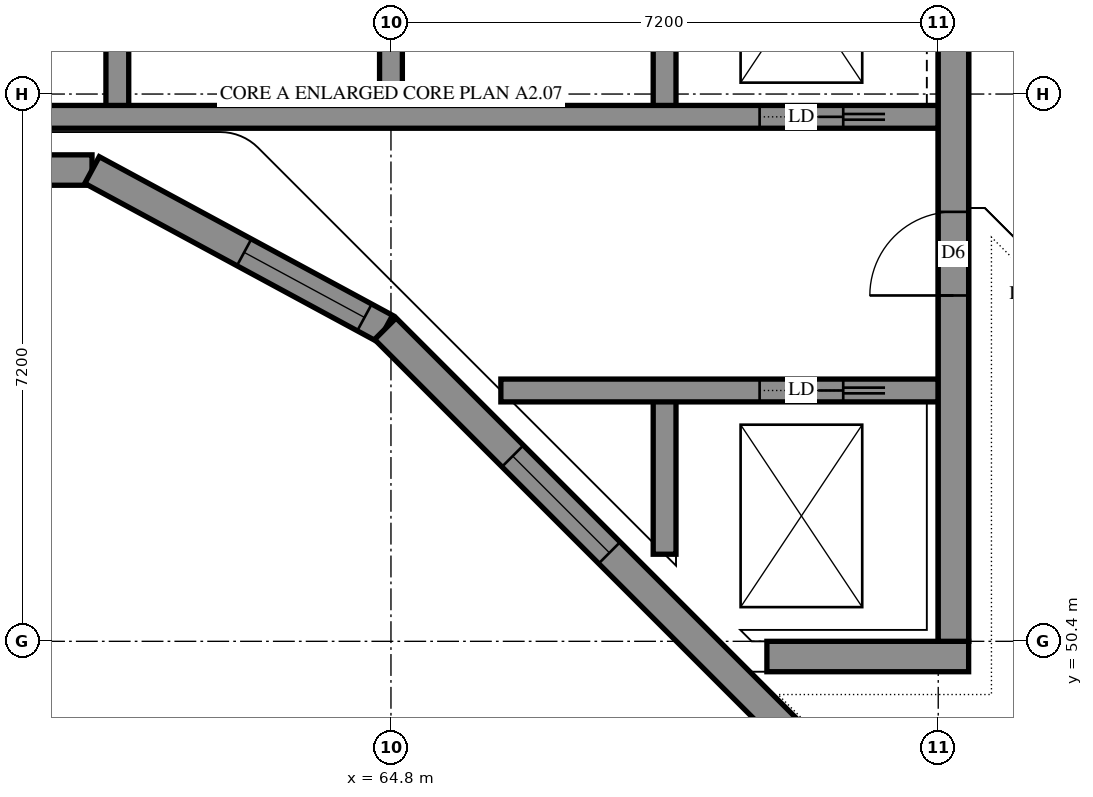
"""IFC4 building model, lengths in metres.
Left out: names, types, materials, properties, quantities, classifications, styles, units other than length and angle.
Written with IfcOpenShell. Run it as: python <this file> out.ifc"""

import sys

from ifc_helpers import new_model, si_unit, direction, frame, frame_2d, origin, place, context, subcontext, project, spatial, polyline, rectangle, outline, extrude, element, fill, save


model = new_model("IFC4")
c1 = context("Model", 3, precision=1e-05, world=origin(), true_north=direction((0.0, 1.0)))
c2 = subcontext(c1, "Body", "Model", "MODEL_VIEW")
j1 = project(units=[si_unit("LENGTHUNIT", "METRE"), si_unit("PLANEANGLEUNIT", "RADIAN")], contexts=[c1])
p1 = place(None, origin())
s1 = spatial("IfcSite", under=j1, at=p1, CompositionType="ELEMENT")
p2 = place(p1, origin())
s2 = spatial("IfcBuilding", under=s1, at=p2, CompositionType="ELEMENT")
p3 = place(p2, frame((0.0, 0.0, 298.2)))
s3 = spatial("IfcBuildingStorey", under=s2, at=p3, CompositionType="ELEMENT", Elevation=298.2)
p4 = place(p3, frame((69.746, 50.2, -0.3), z_axis=(0.0, 0.0, 1.0), x_axis=(1.0, 0.0, 0.0)))
e1 = element("IfcWall", 1, at=p4, inside=s3, PredefinedType="SHEAR", context=c2, shape_type="SweptSolid", body=[
    extrude(outline(polyline([(0.0, 0.0), (2.654, 0.0), (2.654, 3.1), (0.0, 3.1), (0.0, 0.0)])), frame((0.0, 0.2, 0.0), z_axis=(0.0, -1.0, 0.0), x_axis=(1.0, 0.0, 0.0)), (0.0, 0.0, 1.0), 0.4),
])
p5 = place(p3, frame((72.2, 50.4, -0.3), z_axis=(0.0, 0.0, 1.0), x_axis=(0.0, 1.0, 0.0)))
e2 = element("IfcWall", 2, at=p5, inside=s3, PredefinedType="SHEAR", context=c2, shape_type="SweptSolid", body=[
    extrude(outline(polyline([(0.0, 0.0), (14.4, 0.0), (14.4, 3.1), (0.0, 3.1), (0.0, 0.0)])), frame((0.0, 0.2, 0.0), z_axis=(0.0, -1.0, 0.0), x_axis=(1.0, 0.0, 0.0)), (0.0, 0.0, 1.0), 0.4),
])
p6 = place(p5, frame((4.55, 0.0, 0.3)))
e3 = element("IfcOpeningElement", 3, at=p6, cuts=e2, PredefinedType="OPENING", context=c2, shape_type="SweptSolid", body=[
    extrude(rectangle(XDim=1.1, YDim=2.1, at=frame_2d((0.55, 1.05))), frame((0.0, 0.21, 0.0), z_axis=(0.0, -1.0, 0.0), x_axis=(1.0, 0.0, 0.0)), (0.0, 0.0, 1.0), 0.42),
])
p7 = place(p5, frame((11.35, 0.0, 0.3)))
e4 = element("IfcOpeningElement", 4, at=p7, cuts=e2, PredefinedType="OPENING", context=c2, shape_type="SweptSolid", body=[
    extrude(rectangle(XDim=1.1, YDim=2.1, at=frame_2d((0.55, 1.05))), frame((0.0, 0.21, 0.0), z_axis=(0.0, -1.0, 0.0), x_axis=(1.0, 0.0, 0.0)), (0.0, 0.0, 1.0), 0.42),
])
for number, where, z_axis, x_axis in (
    (5, (61.2, 57.3, 0.0), (0.0, 0.0, 1.0), (0.0, 1.0, 0.0)),
    (6, (64.8, 57.3, 0.0), (0.0, 0.0, 1.0), (0.0, 1.0, 0.0)),
):
    element("IfcWall", number, at=place(p3, frame(where, z_axis=z_axis, x_axis=x_axis)), inside=s3, PredefinedType="SOLIDWALL", context=c2, shape_type="SweptSolid", body=[
        extrude(outline(polyline([(0.0, 0.0), (3.3, 0.0), (3.3, 3.5), (0.0, 3.5), (0.0, 0.0)])), frame((0.0, 0.15, 0.0), z_axis=(0.0, -1.0, 0.0), x_axis=(1.0, 0.0, 0.0)), (0.0, 0.0, 1.0), 0.3),
    ])
p8 = place(p3, frame((68.4, 51.546, 0.0), z_axis=(0.0, 0.0, 1.0), x_axis=(0.0, 1.0, 0.0)))
e7 = element("IfcWall", 7, at=p8, inside=s3, PredefinedType="SOLIDWALL", context=c2, shape_type="SweptSolid", body=[
    extrude(outline(polyline([(0.0, 0.0), (2.154, 0.0), (2.154, 3.5), (0.0, 3.5), (0.0, 0.0)])), frame((0.0, 0.15, 0.0), z_axis=(0.0, -1.0, 0.0), x_axis=(1.0, 0.0, 0.0)), (0.0, 0.0, 1.0), 0.3),
])
p9 = place(p3, frame((68.4, 57.3, 0.0), z_axis=(0.0, 0.0, 1.0), x_axis=(0.0, 1.0, 0.0)))
e8 = element("IfcWall", 8, at=p9, inside=s3, PredefinedType="SOLIDWALL", context=c2, shape_type="SweptSolid", body=[
    extrude(outline(polyline([(0.0, 0.0), (3.3, 0.0), (3.3, 3.5), (0.0, 3.5), (0.0, 0.0)])), frame((0.0, 0.15, 0.0), z_axis=(0.0, -1.0, 0.0), x_axis=(1.0, 0.0, 0.0)), (0.0, 0.0, 1.0), 0.3),
])
p10 = place(p3, frame((66.246, 53.7, 0.0), z_axis=(0.0, 0.0, 1.0), x_axis=(1.0, 0.0, 0.0)))
e9 = element("IfcWall", 9, at=p10, inside=s3, PredefinedType="SOLIDWALL", context=c2, shape_type="SweptSolid", body=[
    extrude(outline(polyline([(0.0, 0.0), (5.754, 0.0), (5.754, 3.5), (0.0, 3.5), (0.0, 0.0)])), frame((0.0, 0.15, 0.0), z_axis=(0.0, -1.0, 0.0), x_axis=(1.0, 0.0, 0.0)), (0.0, 0.0, 1.0), 0.3),
])
p11 = place(p10, frame((3.404, 0.0, 0.0)))
e10 = element("IfcOpeningElement", 10, at=p11, cuts=e9, PredefinedType="OPENING", context=c2, shape_type="SweptSolid", body=[
    extrude(rectangle(XDim=1.1, YDim=2.1, at=frame_2d((0.55, 1.05))), frame((0.0, 0.16, 0.0), z_axis=(0.0, -1.0, 0.0), x_axis=(1.0, 0.0, 0.0)), (0.0, 0.0, 1.0), 0.32),
])
p12 = place(p3, frame((57.6, 57.3, 0.0), z_axis=(0.0, 0.0, 1.0), x_axis=(1.0, 0.0, 0.0)))
e11 = element("IfcWall", 11, at=p12, inside=s3, PredefinedType="SOLIDWALL", context=c2, shape_type="SweptSolid", body=[
    extrude(outline(polyline([(0.0, 0.0), (14.4, 0.0), (14.4, 3.5), (0.0, 3.5), (0.0, 0.0)])), frame((0.0, 0.15, 0.0), z_axis=(0.0, -1.0, 0.0), x_axis=(1.0, 0.0, 0.0)), (0.0, 0.0, 1.0), 0.3),
])
p13 = place(p12, frame((12.05, 0.0, 0.0)))
e12 = element("IfcOpeningElement", 12, at=p13, cuts=e11, PredefinedType="OPENING", context=c2, shape_type="SweptSolid", body=[
    extrude(rectangle(XDim=1.1, YDim=2.1, at=frame_2d((0.55, 1.05))), frame((0.0, 0.16, 0.0), z_axis=(0.0, -1.0, 0.0), x_axis=(1.0, 0.0, 0.0)), (0.0, 0.0, 1.0), 0.32),
])
p14 = place(p3, frame((56.6, 56.6, 0.0), z_axis=(0.0, 0.0, 1.0), x_axis=(1.0, 0.0, 0.0)))
e13 = element("IfcWall", 13, at=p14, inside=s3, PredefinedType="SOLIDWALL", context=c2, shape_type="SweptSolid", body=[
    extrude(outline(polyline([(-0.2, -0.2), (4.216, -0.2), (4.318, 0.2), (0.2, 0.2), (-0.2, -0.2)])), origin(), (0.0, 0.0, 1.0), 3.5),
])
p15 = place(p14, frame((1.633, 0.0, 0.7)))
e14 = element("IfcOpeningElement", 14, at=p15, cuts=e13, PredefinedType="OPENING", context=c2, shape_type="SweptSolid", body=[
    extrude(rectangle(XDim=1.8, YDim=2.2, at=frame_2d((0.9, 1.1))), frame((0.0, 0.21, 0.0), z_axis=(0.0, -1.0, 0.0), x_axis=(1.0, 0.0, 0.0)), (0.0, 0.0, 1.0), 0.42),
])
p16 = place(p3, frame((60.867, 56.6, 0.0), z_axis=(0.0, 0.0, 1.0), x_axis=(0.8795817564, -0.4757477628, 0.0)))
e15 = element("IfcWall", 15, at=p16, inside=s3, PredefinedType="SOLIDWALL", context=c2, shape_type="SweptSolid", body=[
    extrude(outline(polyline([(0.051, -0.2), (4.358, -0.2), (4.416, 0.2), (-0.051, 0.2), (0.051, -0.2)])), origin(), (0.0, 0.0, 1.0), 3.5),
])
p17 = place(p16, frame((2.276, 0.0, 0.7)))
e16 = element("IfcOpeningElement", 16, at=p17, cuts=e15, PredefinedType="OPENING", context=c2, shape_type="SweptSolid", body=[
    extrude(rectangle(XDim=1.8, YDim=2.2, at=frame_2d((0.9, 1.1))), frame((0.0, 0.21, 0.0), z_axis=(0.0, -1.0, 0.0), x_axis=(1.0, 0.0, 0.0)), (0.0, 0.0, 1.0), 0.42),
])
p18 = place(p3, frame((64.726, 54.513, 0.0), z_axis=(0.0, 0.0, 1.0), x_axis=(0.7071067812, -0.7071067812, 0.0)))
e17 = element("IfcWall", 17, at=p18, inside=s3, PredefinedType="SOLIDWALL", context=c2, shape_type="SweptSolid", body=[
    extrude(outline(polyline([(0.029, -0.2), (8.285, -0.2), (8.285, 0.2), (-0.029, 0.2), (0.029, -0.2)])), origin(), (0.0, 0.0, 1.0), 3.5),
])
p19 = place(p18, frame((2.369, 0.0, 0.7)))
e18 = element("IfcOpeningElement", 18, at=p19, cuts=e17, PredefinedType="OPENING", context=c2, shape_type="SweptSolid", body=[
    extrude(rectangle(XDim=1.8, YDim=2.2, at=frame_2d((0.9, 1.1))), frame((0.0, 0.21, 0.0), z_axis=(0.0, -1.0, 0.0), x_axis=(1.0, 0.0, 0.0)), (0.0, 0.0, 1.0), 0.42),
])
p20 = place(p17, origin())
e19 = element("IfcWindow", 19, at=p20, inside=s3, PartitioningType="SINGLE_PANEL", PredefinedType="WINDOW", context=c2, shape_type="SweptSolid", body=[
    extrude(rectangle(XDim=1.8, YDim=2.2, at=frame_2d((0.9, 1.1))), frame((0.0, 0.08, 0.0), z_axis=(0.0, -1.0, 0.0), x_axis=(1.0, 0.0, 0.0)), (0.0, 0.0, 1.0), 0.06),
])
fill(e16, e19)
p21 = place(p19, origin())
e20 = element("IfcWindow", 20, at=p21, inside=s3, PartitioningType="SINGLE_PANEL", PredefinedType="WINDOW", context=c2, shape_type="SweptSolid", body=[
    extrude(rectangle(XDim=1.8, YDim=2.2, at=frame_2d((0.9, 1.1))), frame((0.0, 0.08, 0.0), z_axis=(0.0, -1.0, 0.0), x_axis=(1.0, 0.0, 0.0)), (0.0, 0.0, 1.0), 0.06),
])
fill(e18, e20)
p22 = place(p6, origin())
e21 = element("IfcDoor", 21, at=p22, inside=s3, OperationType="DOUBLE_DOOR_SINGLE_SWING", PredefinedType="DOOR", context=c2, shape_type="SweptSolid", body=[
    extrude(rectangle(XDim=1.1, YDim=2.1, at=frame_2d((0.55, 1.05))), frame((0.0, 0.025, 0.0), z_axis=(0.0, -1.0, 0.0), x_axis=(1.0, 0.0, 0.0)), (0.0, 0.0, 1.0), 0.05),
])
fill(e3, e21)
p23 = place(p11, origin())
e22 = element("IfcDoor", 22, at=p23, inside=s3, OperationType="SLIDING_TO_RIGHT", PredefinedType="DOOR", context=c2, shape_type="SweptSolid", body=[
    extrude(rectangle(XDim=1.1, YDim=2.1, at=frame_2d((0.55, 1.05))), frame((0.0, 0.025, 0.0), z_axis=(0.0, -1.0, 0.0), x_axis=(1.0, 0.0, 0.0)), (0.0, 0.0, 1.0), 0.05),
])
fill(e10, e22)
p24 = place(p13, origin())
e23 = element("IfcDoor", 23, at=p24, inside=s3, OperationType="SLIDING_TO_RIGHT", PredefinedType="DOOR", context=c2, shape_type="SweptSolid", body=[
    extrude(rectangle(XDim=1.1, YDim=2.1, at=frame_2d((0.55, 1.05))), frame((0.0, 0.025, 0.0), z_axis=(0.0, -1.0, 0.0), x_axis=(1.0, 0.0, 0.0)), (0.0, 0.0, 1.0), 0.05),
])
fill(e12, e23)
save(model, sys.argv[1])
